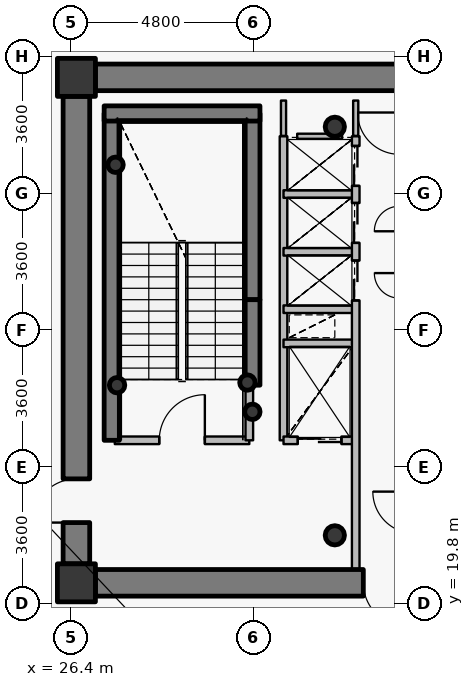
"""IFC4 building model, lengths in metres.
Left out: names, types, materials, properties, quantities, classifications, styles, units other than length and angle.
Written with IfcOpenShell. Run it as: python <this file> out.ifc"""

import sys

from ifc_helpers import new_model, si_unit, direction, frame, frame_2d, origin, origin_2d, place, context, subcontext, project, spatial, rectangle, hollow_circle, extrude, source, transform, mapped, element, fill, save


model = new_model("IFC4")
c1 = context("Model", 3, precision=1e-05, world=origin(), true_north=direction((0.0, 1.0)))
c2 = subcontext(c1, "Body", "Model", "MODEL_VIEW")
j1 = project(units=[si_unit("LENGTHUNIT", "METRE"), si_unit("PLANEANGLEUNIT", "RADIAN")], contexts=[c1])
p1 = place(None, origin())
s1 = spatial("IfcSite", under=j1, at=p1, CompositionType="ELEMENT")
p2 = place(p1, origin())
s2 = spatial("IfcBuilding", under=s1, at=p2, CompositionType="ELEMENT")
p3 = place(p2, frame((0.0, 0.0, 251.55)))
s3 = spatial("IfcBuildingStorey", under=s2, at=p3, CompositionType="ELEMENT", Elevation=251.55)
for number, where, z_axis, x_axis in (
    (1, (26.55, 20.35, 0.0), (0.0, 0.0, 1.0), (1.0, 0.0, 0.0)),
    (2, (26.55, 33.65, 0.0), (0.0, 0.0, 1.0), (1.0, 0.0, 0.0)),
):
    element("IfcColumn", number, at=place(p3, frame(where, z_axis=z_axis, x_axis=x_axis)), inside=s3, PredefinedType="COLUMN", context=c2, shape_type="SweptSolid", body=[
        extrude(rectangle(XDim=1.0, YDim=1.0, at=origin_2d()), origin(), (0.0, 0.0, 1.0), 3.75),
    ])
for number, where, z_axis, x_axis in (
    (3, (33.35, 21.6, 0.0), (0.0, 0.0, 1.0), (1.0, 0.0, 0.0)),
    (4, (33.35, 32.35, 0.0), (0.0, 0.0, 1.0), (1.0, 0.0, 0.0)),
):
    element("IfcColumn", number, at=place(p3, frame(where, z_axis=z_axis, x_axis=x_axis)), inside=s3, PredefinedType="COLUMN", context=c2, shape_type="SweptSolid", body=[
        extrude(hollow_circle(Radius=0.254, WallThickness=0.02, at=origin_2d()), origin(), (0.0, 0.0, 1.0), 3.75),
    ])
p4 = place(p3, frame((27.48, 24.1, 0.0), z_axis=(0.0, 0.0, 1.0), x_axis=(0.0, 1.0, 0.0)))
e5 = element("IfcWall", 5, at=p4, inside=s3, PredefinedType="SHEAR", context=c2, shape_type="SweptSolid", body=[
    extrude(rectangle(XDim=8.6, YDim=0.4, at=frame_2d((4.3, 0.0))), origin(), (0.0, 0.0, 1.0), 3.75),
])
p5 = place(p3, frame((31.18, 27.8, 0.0), z_axis=(0.0, 0.0, 1.0), x_axis=(0.0, 1.0, 0.0)))
e6 = element("IfcWall", 6, at=p5, inside=s3, PredefinedType="SHEAR", context=c2, shape_type="SweptSolid", body=[
    extrude(rectangle(XDim=4.9, YDim=0.4, at=frame_2d((2.45, 0.0))), origin(), (0.0, 0.0, 1.0), 3.75),
])
p6 = place(p3, frame((27.28, 32.7, 0.0), z_axis=(0.0, 0.0, 1.0), x_axis=(1.0, 0.0, 0.0)))
e7 = element("IfcWall", 7, at=p6, inside=s3, PredefinedType="SHEAR", context=c2, shape_type="SweptSolid", body=[
    extrude(rectangle(XDim=4.1, YDim=0.4, at=frame_2d((2.05, 0.0))), origin(), (0.0, 0.0, 1.0), 3.75),
])
for number, where, z_axis, x_axis in (
    (8, (27.58, 31.35, 0.0), (0.0, 0.0, 1.0), (1.0, 0.0, 0.0)),
    (9, (31.05, 25.62, 0.0), (0.0, 0.0, 1.0), (1.0, 0.0, 0.0)),
    (10, (31.18, 24.85, 0.0), (0.0, 0.0, 1.0), (1.0, 0.0, 0.0)),
    (11, (27.62, 25.55, 0.0), (0.0, 0.0, 1.0), (1.0, 0.0, 0.0)),
):
    element("IfcColumn", number, at=place(p3, frame(where, z_axis=z_axis, x_axis=x_axis)), inside=s3, PredefinedType="COLUMN", context=c2, shape_type="SweptSolid", body=[
        extrude(hollow_circle(Radius=0.203, WallThickness=0.016, at=origin_2d()), origin(), (0.0, 0.0, 1.0), 3.75),
    ])
p7 = place(p3, frame((27.05, 33.65, 0.0), z_axis=(0.0, 0.0, 1.0), x_axis=(1.0, 0.0, 0.0)))
e12 = element("IfcWall", 12, at=p7, inside=s3, PredefinedType="SHEAR", context=c2, shape_type="SweptSolid", body=[
    extrude(rectangle(XDim=17.9, YDim=0.7, at=frame_2d((8.95, 0.0))), origin(), (0.0, 0.0, 1.0), 3.05),
])
p8 = place(p7, frame((13.675, 0.0, 0.0)))
e13 = element("IfcOpeningElement", 13, at=p8, cuts=e12, PredefinedType="OPENING", context=c2, shape_type="SweptSolid", body=[
    extrude(rectangle(XDim=1.15, YDim=2.15, at=origin_2d()), frame((0.575, 0.36, 1.075), z_axis=(0.0, -1.0, 0.0), x_axis=(1.0, 0.0, 0.0)), (0.0, 0.0, 1.0), 0.72),
])
p9 = place(p3, frame((44.95, 20.35, 0.0), z_axis=(0.0, 0.0, 1.0), x_axis=(-1.0, 0.0, 0.0)))
e14 = element("IfcWall", 14, at=p9, inside=s3, PredefinedType="SHEAR", context=c2, shape_type="SweptSolid", body=[
    extrude(rectangle(XDim=17.9, YDim=0.7, at=frame_2d((8.95, 0.0))), origin(), (0.0, 0.0, 1.0), 3.05),
])
p10 = place(p9, frame((9.7, 0.0, 0.0)))
e15 = element("IfcOpeningElement", 15, at=p10, cuts=e14, PredefinedType="OPENING", context=c2, shape_type="SweptSolid", body=[
    extrude(rectangle(XDim=1.15, YDim=2.15, at=origin_2d()), frame((0.575, 0.36, 1.075), z_axis=(0.0, -1.0, 0.0), x_axis=(1.0, 0.0, 0.0)), (0.0, 0.0, 1.0), 0.72),
])
p11 = place(p3, frame((26.55, 20.85, 0.0), z_axis=(0.0, 0.0, 1.0), x_axis=(0.0, 1.0, 0.0)))
e16 = element("IfcWall", 16, at=p11, inside=s3, PredefinedType="SHEAR", context=c2, shape_type="SweptSolid", body=[
    extrude(rectangle(XDim=12.3, YDim=0.7, at=frame_2d((6.15, 0.0))), origin(), (0.0, 0.0, 1.0), 3.05),
])
p12 = place(p11, frame((1.085, 0.0, 0.0)))
e17 = element("IfcOpeningElement", 17, at=p12, cuts=e16, PredefinedType="OPENING", context=c2, shape_type="SweptSolid", body=[
    extrude(rectangle(XDim=1.15, YDim=2.15, at=origin_2d()), frame((0.575, 0.36, 1.075), z_axis=(0.0, -1.0, 0.0), x_axis=(1.0, 0.0, 0.0)), (0.0, 0.0, 1.0), 0.72),
])
p13 = place(p3, frame((31.18, 25.55, 0.0), z_axis=(0.0, 0.0, 1.0), x_axis=(0.0, 1.0, 0.0)))
e18 = element("IfcWall", 18, at=p13, inside=s3, PredefinedType="SHEAR", context=c2, shape_type="SweptSolid", body=[
    extrude(rectangle(XDim=2.25, YDim=0.4, at=frame_2d((1.125, 0.0))), origin(), (0.0, 0.0, 1.0), 3.1),
])
p14 = place(p3, frame((27.56, 24.1, 0.0), z_axis=(0.0, 0.0, 1.0), x_axis=(1.0, 0.0, 0.0)))
e19 = element("IfcWall", 19, at=p14, inside=s3, PredefinedType="PARTITIONING", context=c2, shape_type="SweptSolid", body=[
    extrude(rectangle(XDim=3.54, YDim=0.2, at=frame_2d((1.77, 0.0))), origin(), (0.0, 0.0, 1.0), 3.5),
])
p15 = place(p14, frame((1.17, 0.0, 0.0)))
e20 = element("IfcOpeningElement", 20, at=p15, cuts=e19, PredefinedType="OPENING", context=c2, shape_type="SweptSolid", body=[
    extrude(rectangle(XDim=1.2, YDim=2.15, at=origin_2d()), frame((0.6, 0.11, 1.075), z_axis=(0.0, -1.0, 0.0), x_axis=(1.0, 0.0, 0.0)), (0.0, 0.0, 1.0), 0.22),
])
p16 = place(p3, frame((31.1, 24.1, 0.0), z_axis=(0.0, 0.0, 1.0), x_axis=(0.0, 1.0, 0.0)))
e21 = element("IfcWall", 21, at=p16, inside=s3, PredefinedType="PARTITIONING", context=c2, shape_type="SweptSolid", body=[
    extrude(rectangle(XDim=1.44, YDim=0.2, at=frame_2d((0.72, 0.0))), origin(), (0.0, 0.0, 1.0), 3.5),
])
p17 = place(p3, frame((32.0, 24.1, 0.0), z_axis=(0.0, 0.0, 1.0), x_axis=(0.0, 1.0, 0.0)))
e22 = element("IfcWall", 22, at=p17, inside=s3, PredefinedType="PARTITIONING", context=c2, shape_type="SweptSolid", body=[
    extrude(rectangle(XDim=8.0, YDim=0.2, at=frame_2d((4.0, 0.0))), origin(), (0.0, 0.0, 1.0), 3.5),
])
p18 = place(p3, frame((32.0, 24.1, 0.0), z_axis=(0.0, 0.0, 1.0), x_axis=(1.0, 0.0, 0.0)))
e23 = element("IfcWall", 23, at=p18, inside=s3, PredefinedType="PARTITIONING", context=c2, shape_type="SweptSolid", body=[
    extrude(rectangle(XDim=1.9, YDim=0.2, at=frame_2d((0.95, 0.0))), origin(), (0.0, 0.0, 1.0), 3.085),
])
p19 = place(p18, frame((0.375, 0.0, 0.0)))
e24 = element("IfcOpeningElement", 24, at=p19, cuts=e23, PredefinedType="OPENING", context=c2, shape_type="SweptSolid", body=[
    extrude(rectangle(XDim=1.15, YDim=2.15, at=origin_2d()), frame((0.575, 0.11, 1.075), z_axis=(0.0, -1.0, 0.0), x_axis=(1.0, 0.0, 0.0)), (0.0, 0.0, 1.0), 0.22),
])
for number, where, z_axis, x_axis in (
    (25, (32.0, 26.65, 0.0), (0.0, 0.0, 1.0), (1.0, 0.0, 0.0)),
    (26, (32.0, 27.55, 0.0), (0.0, 0.0, 1.0), (1.0, 0.0, 0.0)),
    (27, (32.0, 29.06, 0.0), (0.0, 0.0, 1.0), (1.0, 0.0, 0.0)),
    (28, (32.0, 30.58, 0.0), (0.0, 0.0, 1.0), (1.0, 0.0, 0.0)),
):
    element("IfcWall", number, at=place(p3, frame(where, z_axis=z_axis, x_axis=x_axis)), inside=s3, PredefinedType="PARTITIONING", context=c2, shape_type="SweptSolid", body=[
        extrude(rectangle(XDim=1.9, YDim=0.2, at=frame_2d((0.95, 0.0))), origin(), (0.0, 0.0, 1.0), 3.085),
    ])
p20 = place(p3, frame((33.9, 20.7, 0.0), z_axis=(0.0, 0.0, 1.0), x_axis=(0.0, 1.0, 0.0)))
e29 = element("IfcWall", 29, at=p20, inside=s3, PredefinedType="PARTITIONING", context=c2, shape_type="SweptSolid", body=[
    extrude(rectangle(XDim=11.4, YDim=0.2, at=frame_2d((5.7, 0.0))), origin(), (0.0, 0.0, 1.0), 3.085),
])
p21 = place(p20, frame((7.08, 0.0, 0.0)))
e30 = element("IfcOpeningElement", 30, at=p21, cuts=e29, PredefinedType="OPENING", context=c2, shape_type="SweptSolid", body=[
    extrude(rectangle(XDim=1.05, YDim=2.15, at=origin_2d()), frame((0.525, 0.11, 1.075), z_axis=(0.0, -1.0, 0.0), x_axis=(1.0, 0.0, 0.0)), (0.0, 0.0, 1.0), 0.22),
])
p22 = place(p20, frame((8.595, 0.0, 0.0)))
e31 = element("IfcOpeningElement", 31, at=p22, cuts=e29, PredefinedType="OPENING", context=c2, shape_type="SweptSolid", body=[
    extrude(rectangle(XDim=1.05, YDim=2.15, at=origin_2d()), frame((0.525, 0.11, 1.075), z_axis=(0.0, -1.0, 0.0), x_axis=(1.0, 0.0, 0.0)), (0.0, 0.0, 1.0), 0.22),
])
p23 = place(p20, frame((10.095, 0.0, 0.0)))
e32 = element("IfcOpeningElement", 32, at=p23, cuts=e29, PredefinedType="OPENING", context=c2, shape_type="SweptSolid", body=[
    extrude(rectangle(XDim=1.05, YDim=2.15, at=origin_2d()), frame((0.525, 0.11, 1.075), z_axis=(0.0, -1.0, 0.0), x_axis=(1.0, 0.0, 0.0)), (0.0, 0.0, 1.0), 0.22),
])
p24 = place(p3, frame((32.36, 32.1, 0.0), z_axis=(0.0, 0.0, 1.0), x_axis=(1.0, 0.0, 0.0)))
e33 = element("IfcWall", 33, at=p24, inside=s3, PredefinedType="PARTITIONING", context=c2, shape_type="SweptSolid", body=[
    extrude(rectangle(XDim=1.18, YDim=0.135, at=frame_2d((0.59, 0.0))), origin(), (0.0, 0.0, 1.0), 3.085),
])
p25 = place(p3, frame((32.0, 33.04, 0.0), z_axis=(0.0, 0.0, 1.0), x_axis=(0.0, -1.0, 0.0)))
e34 = element("IfcWall", 34, at=p25, inside=s3, PredefinedType="PARTITIONING", context=c2, shape_type="SweptSolid", body=[
    extrude(rectangle(XDim=0.93, YDim=0.135, at=frame_2d((0.465, 0.0))), origin(), (0.0, 0.0, 1.0), 3.035),
])
p26 = place(p3, frame((33.9, 32.11, 0.0), z_axis=(0.0, 0.0, 1.0), x_axis=(0.0, 1.0, 0.0)))
e35 = element("IfcWall", 35, at=p26, inside=s3, PredefinedType="PARTITIONING", context=c2, shape_type="SweptSolid", body=[
    extrude(rectangle(XDim=0.93, YDim=0.135, at=frame_2d((0.465, 0.0))), origin(), (0.0, 0.0, 1.0), 3.085),
])
p27 = place(p3, frame((27.04, 34.0, 0.0), z_axis=(0.0, 0.0, 1.0), x_axis=(-1.0, 0.0, 0.0)))
e36 = element("IfcWall", 36, at=p27, inside=s3, PredefinedType="PARTITIONING", context=c2, shape_type="SweptSolid", body=[
    extrude(rectangle(XDim=0.84, YDim=0.135, at=frame_2d((0.42, 0.0))), origin(), (0.0, 0.0, 1.0), 2.935),
])
p28 = place(p3, frame((26.2, 33.692, 0.0), z_axis=(0.0, 0.0, 1.0), x_axis=(0.0, -1.0, 0.0)))
e37 = element("IfcWall", 37, at=p28, inside=s3, PredefinedType="PARTITIONING", context=c2, shape_type="SweptSolid", body=[
    extrude(rectangle(XDim=0.532, YDim=0.135, at=frame_2d((0.266, 0.0))), origin(), (0.0, 0.0, 1.0), 3.5),
])
p29 = place(p3, frame((26.2, 20.84, 0.0), z_axis=(0.0, 0.0, 1.0), x_axis=(0.0, -1.0, 0.0)))
e38 = element("IfcWall", 38, at=p29, inside=s3, PredefinedType="PARTITIONING", context=c2, shape_type="SweptSolid", body=[
    extrude(rectangle(XDim=0.84, YDim=0.135, at=frame_2d((0.42, 0.0))), origin(), (0.0, 0.0, 1.0), 3.185),
])
p30 = place(p3, frame((26.508, 20.0, 0.0), z_axis=(0.0, 0.0, 1.0), x_axis=(1.0, 0.0, 0.0)))
e39 = element("IfcWall", 39, at=p30, inside=s3, PredefinedType="PARTITIONING", context=c2, shape_type="SweptSolid", body=[
    extrude(rectangle(XDim=0.532, YDim=0.135, at=frame_2d((0.266, 0.0))), origin(), (0.0, 0.0, 1.0), 2.935),
])
m1 = source(origin(), c2, "Body", "SweptSolid", [
    extrude(rectangle(XDim=1.15, YDim=2.15, at=origin_2d()), frame((0.575, 0.025, 1.075), z_axis=(0.0, -1.0, 0.0), x_axis=(1.0, 0.0, 0.0)), (0.0, 0.0, 1.0), 0.05),
])
p31 = place(p12, origin())
e40 = element("IfcDoor", 40, at=p31, inside=s3, OperationType="SINGLE_SWING_LEFT", PredefinedType="DOOR", context=c2, shape_type="MappedRepresentation", body=[
    mapped(m1, transform((0.0, 0.0, 0.0), x_axis=(1.0, 0.0, 0.0), y_axis=(0.0, 1.0, 0.0), z_axis=(0.0, 0.0, 1.0), scale=1.0)),
])
fill(e17, e40)
p32 = place(p10, origin())
e41 = element("IfcDoor", 41, at=p32, inside=s3, OperationType="SINGLE_SWING_LEFT", PredefinedType="DOOR", context=c2, shape_type="MappedRepresentation", body=[
    mapped(m1, transform((0.0, 0.0, 0.0), x_axis=(1.0, 0.0, 0.0), y_axis=(0.0, 1.0, 0.0), z_axis=(0.0, 0.0, 1.0), scale=1.0)),
])
fill(e15, e41)
m2 = source(origin(), c2, "Body", "SweptSolid", [
    extrude(rectangle(XDim=1.2, YDim=2.15, at=origin_2d()), frame((0.6, 0.025, 1.075), z_axis=(0.0, -1.0, 0.0), x_axis=(1.0, 0.0, 0.0)), (0.0, 0.0, 1.0), 0.05),
])
p33 = place(p15, origin())
e42 = element("IfcDoor", 42, at=p33, inside=s3, OperationType="SINGLE_SWING_RIGHT", PredefinedType="DOOR", context=c2, shape_type="MappedRepresentation", body=[
    mapped(m2, transform((0.0, 0.0, 0.0), x_axis=(1.0, 0.0, 0.0), y_axis=(0.0, 1.0, 0.0), z_axis=(0.0, 0.0, 1.0), scale=1.0)),
])
fill(e20, e42)
m3 = source(origin(), c2, "Body", "SweptSolid", [
    extrude(rectangle(XDim=1.15, YDim=2.15, at=origin_2d()), frame((0.575, 0.025, 1.075), z_axis=(0.0, -1.0, 0.0), x_axis=(1.0, 0.0, 0.0)), (0.0, 0.0, 1.0), 0.05),
])
p34 = place(p19, origin())
e43 = element("IfcDoor", 43, at=p34, inside=s3, OperationType="DOUBLE_DOOR_SLIDING", PredefinedType="USERDEFINED", context=c2, shape_type="MappedRepresentation", body=[
    mapped(m3, transform((0.0, 0.0, 0.0), x_axis=(1.0, 0.0, 0.0), y_axis=(0.0, 1.0, 0.0), z_axis=(0.0, 0.0, 1.0), scale=1.0)),
])
fill(e24, e43)
m4 = source(origin(), c2, "Body", "SweptSolid", [
    extrude(rectangle(XDim=1.05, YDim=2.15, at=origin_2d()), frame((0.525, 0.025, 1.075), z_axis=(0.0, -1.0, 0.0), x_axis=(1.0, 0.0, 0.0)), (0.0, 0.0, 1.0), 0.05),
])
p35 = place(p21, origin())
e44 = element("IfcDoor", 44, at=p35, inside=s3, OperationType="DOUBLE_DOOR_SLIDING", PredefinedType="USERDEFINED", context=c2, shape_type="MappedRepresentation", body=[
    mapped(m4, transform((0.0, 0.0, 0.0), x_axis=(1.0, 0.0, 0.0), y_axis=(0.0, 1.0, 0.0), z_axis=(0.0, 0.0, 1.0), scale=1.0)),
])
fill(e30, e44)
p36 = place(p22, origin())
e45 = element("IfcDoor", 45, at=p36, inside=s3, OperationType="DOUBLE_DOOR_SLIDING", PredefinedType="USERDEFINED", context=c2, shape_type="MappedRepresentation", body=[
    mapped(m4, transform((0.0, 0.0, 0.0), x_axis=(1.0, 0.0, 0.0), y_axis=(0.0, 1.0, 0.0), z_axis=(0.0, 0.0, 1.0), scale=1.0)),
])
fill(e31, e45)
p37 = place(p23, origin())
e46 = element("IfcDoor", 46, at=p37, inside=s3, OperationType="DOUBLE_DOOR_SLIDING", PredefinedType="USERDEFINED", context=c2, shape_type="MappedRepresentation", body=[
    mapped(m4, transform((0.0, 0.0, 0.0), x_axis=(1.0, 0.0, 0.0), y_axis=(0.0, 1.0, 0.0), z_axis=(0.0, 0.0, 1.0), scale=1.0)),
])
fill(e32, e46)
save(model, sys.argv[1])
